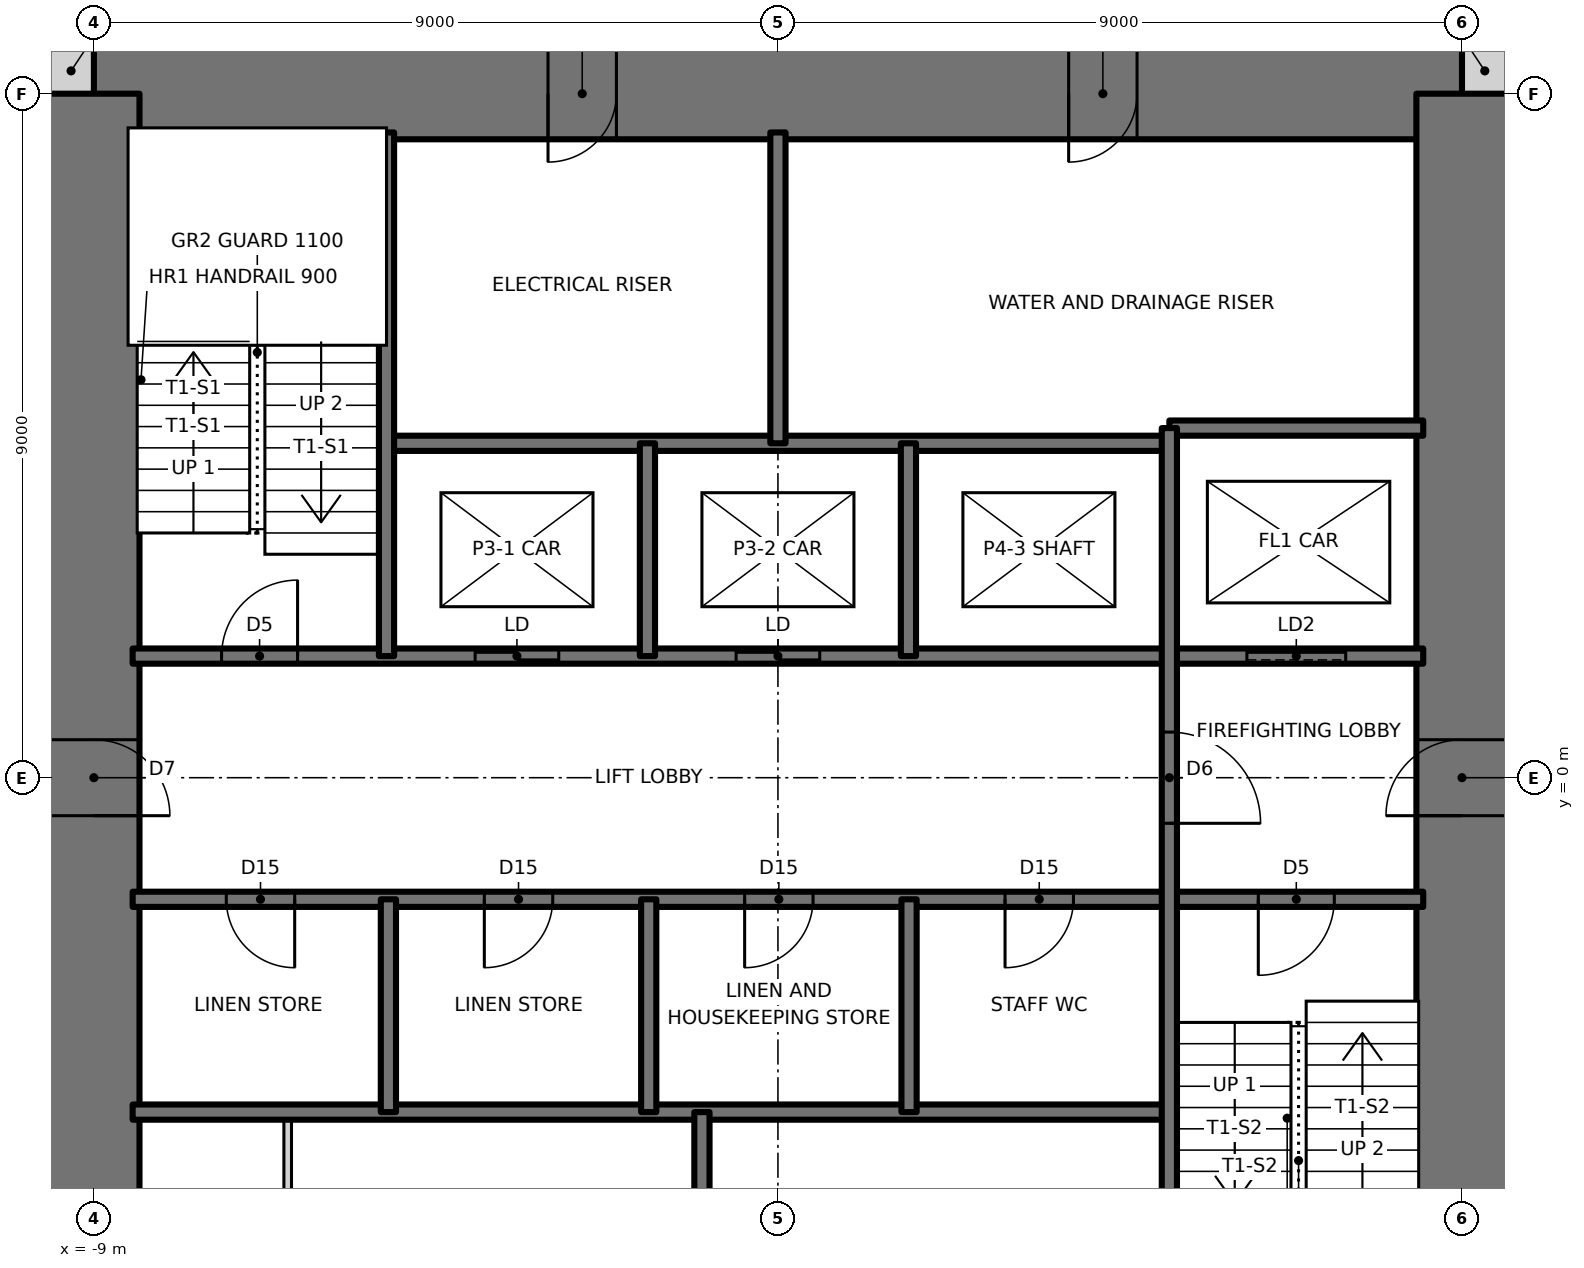
"""IFC4 building model, lengths in metres.
Left out: names, types, materials, properties, quantities, classifications, styles, units other than length and angle.
Written with IfcOpenShell. Run it as: python <this file> out.ifc"""

import sys

from ifc_helpers import new_model, si_unit, direction, frame, frame_2d, origin, place, context, subcontext, project, spatial, rectangle, extrude, element, fill, save


model = new_model("IFC4")
c1 = context("Model", 3, precision=1e-05, world=origin(), true_north=direction((0.0, 1.0)))
c2 = subcontext(c1, "Body", "Model", "MODEL_VIEW")
j1 = project(units=[si_unit("LENGTHUNIT", "METRE"), si_unit("PLANEANGLEUNIT", "RADIAN")], contexts=[c1])
p1 = place(None, origin())
s1 = spatial("IfcSite", under=j1, at=p1, CompositionType="ELEMENT")
p2 = place(p1, origin())
s2 = spatial("IfcBuilding", under=s1, at=p2, CompositionType="ELEMENT")
p3 = place(p2, frame((0.0, 0.0, 202.0)))
s3 = spatial("IfcBuildingStorey", under=s2, at=p3, CompositionType="ELEMENT", Elevation=202.0)
for number, where, z_axis, x_axis in (
    (1, (9.0, 9.3, 0.0), (0.0, 0.0, 1.0), (1.0, 0.0, 0.0)),
    (2, (-9.6, 9.3, 0.0), (0.0, 0.0, 1.0), (1.0, 0.0, 0.0)),
):
    element("IfcWall", number, at=place(p3, frame(where, z_axis=z_axis, x_axis=x_axis)), inside=s3, PredefinedType="SOLIDWALL", context=c2, shape_type="SweptSolid", body=[
        extrude(rectangle(XDim=0.6, YDim=0.6, at=frame_2d((0.3, 0.0))), origin(), (0.0, 0.0, 1.0), 3.5),
    ])
p4 = place(p3, frame((9.0, 9.0, 0.0), z_axis=(0.0, 0.0, 1.0), x_axis=(-1.0, 0.0, 0.0)))
e3 = element("IfcWall", 3, at=p4, inside=s3, PredefinedType="SHEAR", context=c2, shape_type="SweptSolid", body=[
    extrude(rectangle(XDim=18.0, YDim=1.2, at=frame_2d((9.0, 0.0))), origin(), (0.0, 0.0, 1.0), 3.5),
])
p5 = place(p4, frame((11.125, 0.0, 0.0)))
e4 = element("IfcOpeningElement", 4, at=p5, cuts=e3, PredefinedType="OPENING", context=c2, shape_type="SweptSolid", body=[
    extrude(rectangle(XDim=0.9, YDim=2.1, at=frame_2d((0.45, 1.05))), frame((0.0, 0.61, 0.0), z_axis=(0.0, -1.0, 0.0), x_axis=(1.0, 0.0, 0.0)), (0.0, 0.0, 1.0), 1.22),
])
p6 = place(p4, frame((4.275, 0.0, 0.0)))
e5 = element("IfcOpeningElement", 5, at=p6, cuts=e3, PredefinedType="OPENING", context=c2, shape_type="SweptSolid", body=[
    extrude(rectangle(XDim=0.9, YDim=2.1, at=frame_2d((0.45, 1.05))), frame((0.0, 0.61, 0.0), z_axis=(0.0, -1.0, 0.0), x_axis=(1.0, 0.0, 0.0)), (0.0, 0.0, 1.0), 1.22),
])
p7 = place(p3, frame((9.0, -9.0, 0.0), z_axis=(0.0, 0.0, 1.0), x_axis=(0.0, 1.0, 0.0)))
e6 = element("IfcWall", 6, at=p7, inside=s3, PredefinedType="SHEAR", context=c2, shape_type="SweptSolid", body=[
    extrude(rectangle(XDim=18.0, YDim=1.2, at=frame_2d((9.0, 0.0))), origin(), (0.0, 0.0, 1.0), 3.5),
])
p8 = place(p7, frame((8.5, 0.0, 0.0)))
e7 = element("IfcOpeningElement", 7, at=p8, cuts=e6, PredefinedType="OPENING", context=c2, shape_type="SweptSolid", body=[
    extrude(rectangle(XDim=1.0, YDim=2.1, at=frame_2d((0.5, 1.05))), frame((0.0, 0.61, 0.0), z_axis=(0.0, -1.0, 0.0), x_axis=(1.0, 0.0, 0.0)), (0.0, 0.0, 1.0), 1.22),
])
p9 = place(p3, frame((-9.0, 9.0, 0.0), z_axis=(0.0, 0.0, 1.0), x_axis=(0.0, -1.0, 0.0)))
e8 = element("IfcWall", 8, at=p9, inside=s3, PredefinedType="SHEAR", context=c2, shape_type="SweptSolid", body=[
    extrude(rectangle(XDim=18.0, YDim=1.2, at=frame_2d((9.0, 0.0))), origin(), (0.0, 0.0, 1.0), 3.5),
])
p10 = place(p9, frame((8.5, 0.0, 0.0)))
e9 = element("IfcOpeningElement", 9, at=p10, cuts=e8, PredefinedType="OPENING", context=c2, shape_type="SweptSolid", body=[
    extrude(rectangle(XDim=1.0, YDim=2.1, at=frame_2d((0.5, 1.05))), frame((0.0, 0.61, 0.0), z_axis=(0.0, -1.0, 0.0), x_axis=(1.0, 0.0, 0.0)), (0.0, 0.0, 1.0), 1.22),
])
p11 = place(p3, frame((-8.49, -4.4, 0.0), z_axis=(0.0, 0.0, 1.0), x_axis=(1.0, 0.0, 0.0)))
e10 = element("IfcWall", 10, at=p11, inside=s3, PredefinedType="SOLIDWALL", context=c2, shape_type="SweptSolid", body=[
    extrude(rectangle(XDim=13.64, YDim=0.2, at=frame_2d((6.82, 0.0))), origin(), (0.0, 0.0, 1.0), 3.5),
])
p12 = place(p3, frame((-8.49, -1.6, 0.0), z_axis=(0.0, 0.0, 1.0), x_axis=(1.0, 0.0, 0.0)))
e11 = element("IfcWall", 11, at=p12, inside=s3, PredefinedType="SOLIDWALL", context=c2, shape_type="SweptSolid", body=[
    extrude(rectangle(XDim=16.98, YDim=0.2, at=frame_2d((8.49, 0.0))), origin(), (0.0, 0.0, 1.0), 3.5),
])
p13 = place(p12, frame((14.81, 0.0, 0.0)))
e12 = element("IfcOpeningElement", 12, at=p13, cuts=e11, PredefinedType="OPENING", context=c2, shape_type="SweptSolid", body=[
    extrude(rectangle(XDim=1.0, YDim=2.1, at=frame_2d((0.5, 1.05))), frame((0.0, 0.11, 0.0), z_axis=(0.0, -1.0, 0.0), x_axis=(1.0, 0.0, 0.0)), (0.0, 0.0, 1.0), 0.22),
])
p14 = place(p12, frame((1.232, 0.0, 0.0)))
e13 = element("IfcOpeningElement", 13, at=p14, cuts=e11, PredefinedType="OPENING", context=c2, shape_type="SweptSolid", body=[
    extrude(rectangle(XDim=0.9, YDim=2.1, at=frame_2d((0.45, 1.05))), frame((0.0, 0.11, 0.0), z_axis=(0.0, -1.0, 0.0), x_axis=(1.0, 0.0, 0.0)), (0.0, 0.0, 1.0), 0.22),
])
p15 = place(p12, frame((4.627, 0.0, 0.0)))
e14 = element("IfcOpeningElement", 14, at=p15, cuts=e11, PredefinedType="OPENING", context=c2, shape_type="SweptSolid", body=[
    extrude(rectangle(XDim=0.9, YDim=2.1, at=frame_2d((0.45, 1.05))), frame((0.0, 0.11, 0.0), z_axis=(0.0, -1.0, 0.0), x_axis=(1.0, 0.0, 0.0)), (0.0, 0.0, 1.0), 0.22),
])
p16 = place(p12, frame((8.052, 0.0, 0.0)))
e15 = element("IfcOpeningElement", 15, at=p16, cuts=e11, PredefinedType="OPENING", context=c2, shape_type="SweptSolid", body=[
    extrude(rectangle(XDim=0.9, YDim=2.1, at=frame_2d((0.45, 1.05))), frame((0.0, 0.11, 0.0), z_axis=(0.0, -1.0, 0.0), x_axis=(1.0, 0.0, 0.0)), (0.0, 0.0, 1.0), 0.22),
])
p17 = place(p12, frame((11.478, 0.0, 0.0)))
e16 = element("IfcOpeningElement", 16, at=p17, cuts=e11, PredefinedType="OPENING", context=c2, shape_type="SweptSolid", body=[
    extrude(rectangle(XDim=0.9, YDim=2.1, at=frame_2d((0.45, 1.05))), frame((0.0, 0.11, 0.0), z_axis=(0.0, -1.0, 0.0), x_axis=(1.0, 0.0, 0.0)), (0.0, 0.0, 1.0), 0.22),
])
p18 = place(p3, frame((-8.49, 1.6, 0.0), z_axis=(0.0, 0.0, 1.0), x_axis=(1.0, 0.0, 0.0)))
e17 = element("IfcWall", 17, at=p18, inside=s3, PredefinedType="SOLIDWALL", context=c2, shape_type="SweptSolid", body=[
    extrude(rectangle(XDim=16.98, YDim=0.2, at=frame_2d((8.49, 0.0))), origin(), (0.0, 0.0, 1.0), 3.5),
])
p19 = place(p18, frame((1.17, 0.0, 0.0)))
e18 = element("IfcOpeningElement", 18, at=p19, cuts=e17, PredefinedType="OPENING", context=c2, shape_type="SweptSolid", body=[
    extrude(rectangle(XDim=1.0, YDim=2.1, at=frame_2d((0.5, 1.05))), frame((0.0, 0.11, 0.0), z_axis=(0.0, -1.0, 0.0), x_axis=(1.0, 0.0, 0.0)), (0.0, 0.0, 1.0), 0.22),
])
p20 = place(p18, frame((4.506, 0.0, 0.0)))
e19 = element("IfcOpeningElement", 19, at=p20, cuts=e17, PredefinedType="OPENING", context=c2, shape_type="SweptSolid", body=[
    extrude(rectangle(XDim=1.1, YDim=2.1, at=frame_2d((0.55, 1.05))), frame((0.0, 0.11, 0.0), z_axis=(0.0, -1.0, 0.0), x_axis=(1.0, 0.0, 0.0)), (0.0, 0.0, 1.0), 0.22),
])
p21 = place(p18, frame((7.94, 0.0, 0.0)))
e20 = element("IfcOpeningElement", 20, at=p21, cuts=e17, PredefinedType="OPENING", context=c2, shape_type="SweptSolid", body=[
    extrude(rectangle(XDim=1.1, YDim=2.1, at=frame_2d((0.55, 1.05))), frame((0.0, 0.11, 0.0), z_axis=(0.0, -1.0, 0.0), x_axis=(1.0, 0.0, 0.0)), (0.0, 0.0, 1.0), 0.22),
])
p22 = place(p18, frame((14.66, 0.0, 0.0)))
e21 = element("IfcOpeningElement", 21, at=p22, cuts=e17, PredefinedType="OPENING", context=c2, shape_type="SweptSolid", body=[
    extrude(rectangle(XDim=1.3, YDim=2.1, at=frame_2d((0.65, 1.05))), frame((0.0, 0.11, 0.0), z_axis=(0.0, -1.0, 0.0), x_axis=(1.0, 0.0, 0.0)), (0.0, 0.0, 1.0), 0.22),
])
p23 = place(p3, frame((-5.15, 4.4, 0.0), z_axis=(0.0, 0.0, 1.0), x_axis=(1.0, 0.0, 0.0)))
e22 = element("IfcWall", 22, at=p23, inside=s3, PredefinedType="SOLIDWALL", context=c2, shape_type="SweptSolid", body=[
    extrude(rectangle(XDim=10.3, YDim=0.2, at=frame_2d((5.15, 0.0))), origin(), (0.0, 0.0, 1.0), 3.5),
])
p24 = place(p3, frame((5.15, 4.6, 0.0), z_axis=(0.0, 0.0, 1.0), x_axis=(1.0, 0.0, 0.0)))
e23 = element("IfcWall", 23, at=p24, inside=s3, PredefinedType="SOLIDWALL", context=c2, shape_type="SweptSolid", body=[
    extrude(rectangle(XDim=3.34, YDim=0.2, at=frame_2d((1.67, 0.0))), origin(), (0.0, 0.0, 1.0), 3.5),
])
p25 = place(p3, frame((5.15, -8.49, 0.0), z_axis=(0.0, 0.0, 1.0), x_axis=(0.0, 1.0, 0.0)))
e24 = element("IfcWall", 24, at=p25, inside=s3, PredefinedType="SOLIDWALL", context=c2, shape_type="SweptSolid", body=[
    extrude(rectangle(XDim=13.09, YDim=0.2, at=frame_2d((6.545, 0.0))), origin(), (0.0, 0.0, 1.0), 3.5),
])
p26 = place(p25, frame((7.89, 0.0, 0.0)))
e25 = element("IfcOpeningElement", 25, at=p26, cuts=e24, PredefinedType="OPENING", context=c2, shape_type="SweptSolid", body=[
    extrude(rectangle(XDim=1.2, YDim=2.1, at=frame_2d((0.6, 1.05))), frame((0.0, 0.11, 0.0), z_axis=(0.0, -1.0, 0.0), x_axis=(1.0, 0.0, 0.0)), (0.0, 0.0, 1.0), 0.22),
])
for number, where, z_axis, x_axis in (
    (26, (1.725, -4.4, 0.0), (0.0, 0.0, 1.0), (0.0, 1.0, 0.0)),
    (27, (1.717, 1.6, 0.0), (0.0, 0.0, 1.0), (0.0, 1.0, 0.0)),
):
    element("IfcWall", number, at=place(p3, frame(where, z_axis=z_axis, x_axis=x_axis)), inside=s3, PredefinedType="SOLIDWALL", context=c2, shape_type="SweptSolid", body=[
        extrude(rectangle(XDim=2.8, YDim=0.2, at=frame_2d((1.4, 0.0))), origin(), (0.0, 0.0, 1.0), 3.5),
    ])
for number, where, z_axis, x_axis in (
    (28, (0.0, 4.4, 0.0), (0.0, 0.0, 1.0), (0.0, 1.0, 0.0)),
    (29, (-1.0, -8.49, 0.0), (0.0, 0.0, 1.0), (0.0, 1.0, 0.0)),
):
    element("IfcWall", number, at=place(p3, frame(where, z_axis=z_axis, x_axis=x_axis)), inside=s3, PredefinedType="SOLIDWALL", context=c2, shape_type="SweptSolid", body=[
        extrude(rectangle(XDim=4.09, YDim=0.2, at=frame_2d((2.045, 0.0))), origin(), (0.0, 0.0, 1.0), 3.5),
    ])
for number, where, z_axis, x_axis in (
    (30, (-1.7, -4.4, 0.0), (0.0, 0.0, 1.0), (0.0, 1.0, 0.0)),
    (31, (-1.717, 1.6, 0.0), (0.0, 0.0, 1.0), (0.0, 1.0, 0.0)),
    (32, (-5.125, -4.4, 0.0), (0.0, 0.0, 1.0), (0.0, 1.0, 0.0)),
):
    element("IfcWall", number, at=place(p3, frame(where, z_axis=z_axis, x_axis=x_axis)), inside=s3, PredefinedType="SOLIDWALL", context=c2, shape_type="SweptSolid", body=[
        extrude(rectangle(XDim=2.8, YDim=0.2, at=frame_2d((1.4, 0.0))), origin(), (0.0, 0.0, 1.0), 3.5),
    ])
p27 = place(p3, frame((-5.15, 1.6, 0.0), z_axis=(0.0, 0.0, 1.0), x_axis=(0.0, 1.0, 0.0)))
e33 = element("IfcWall", 33, at=p27, inside=s3, PredefinedType="SOLIDWALL", context=c2, shape_type="SweptSolid", body=[
    extrude(rectangle(XDim=6.89, YDim=0.2, at=frame_2d((3.445, 0.0))), origin(), (0.0, 0.0, 1.0), 3.5),
])
p28 = place(p3, frame((-6.45, -8.49, 0.0), z_axis=(0.0, 0.0, 1.0), x_axis=(0.0, 1.0, 0.0)))
e34 = element("IfcWall", 34, at=p28, inside=s3, PredefinedType="PARTITIONING", context=c2, shape_type="SweptSolid", body=[
    extrude(rectangle(XDim=4.09, YDim=0.1, at=frame_2d((2.045, 0.0))), origin(), (0.0, 0.0, 1.0), 3.3),
])
p29 = place(p28, frame((1.595, 0.0, 0.0)))
e35 = element("IfcOpeningElement", 35, at=p29, cuts=e34, PredefinedType="OPENING", context=c2, shape_type="SweptSolid", body=[
    extrude(rectangle(XDim=0.9, YDim=2.1, at=frame_2d((0.45, 1.05))), frame((0.0, 0.06, 0.0), z_axis=(0.0, -1.0, 0.0), x_axis=(1.0, 0.0, 0.0)), (0.0, 0.0, 1.0), 0.12),
])
p30 = place(p19, origin())
e36 = element("IfcDoor", 36, at=p30, inside=s3, OperationType="SINGLE_SWING_RIGHT", PredefinedType="DOOR", context=c2, shape_type="SweptSolid", body=[
    extrude(rectangle(XDim=1.0, YDim=2.1, at=frame_2d((0.5, 1.05))), frame((0.0, 0.025, 0.0), z_axis=(0.0, -1.0, 0.0), x_axis=(1.0, 0.0, 0.0)), (0.0, 0.0, 1.0), 0.05),
])
fill(e18, e36)
p31 = place(p13, frame((1.0, 0.0, 0.0), z_axis=(0.0, 0.0, 1.0), x_axis=(-1.0, 0.0, 0.0)))
e37 = element("IfcDoor", 37, at=p31, inside=s3, OperationType="SINGLE_SWING_RIGHT", PredefinedType="DOOR", context=c2, shape_type="SweptSolid", body=[
    extrude(rectangle(XDim=1.0, YDim=2.1, at=frame_2d((0.5, 1.05))), frame((0.0, 0.025, 0.0), z_axis=(0.0, -1.0, 0.0), x_axis=(1.0, 0.0, 0.0)), (0.0, 0.0, 1.0), 0.05),
])
fill(e12, e37)
p32 = place(p26, frame((1.2, 0.0, 0.0), z_axis=(0.0, 0.0, 1.0), x_axis=(-1.0, 0.0, 0.0)))
e38 = element("IfcDoor", 38, at=p32, inside=s3, OperationType="SINGLE_SWING_RIGHT", PredefinedType="DOOR", context=c2, shape_type="SweptSolid", body=[
    extrude(rectangle(XDim=1.2, YDim=2.1, at=frame_2d((0.6, 1.05))), frame((0.0, 0.025, 0.0), z_axis=(0.0, -1.0, 0.0), x_axis=(1.0, 0.0, 0.0)), (0.0, 0.0, 1.0), 0.05),
])
fill(e25, e38)
p33 = place(p14, frame((0.9, 0.0, 0.0), z_axis=(0.0, 0.0, 1.0), x_axis=(-1.0, 0.0, 0.0)))
e39 = element("IfcDoor", 39, at=p33, inside=s3, OperationType="SINGLE_SWING_LEFT", PredefinedType="DOOR", context=c2, shape_type="SweptSolid", body=[
    extrude(rectangle(XDim=0.9, YDim=2.1, at=frame_2d((0.45, 1.05))), frame((0.0, 0.025, 0.0), z_axis=(0.0, -1.0, 0.0), x_axis=(1.0, 0.0, 0.0)), (0.0, 0.0, 1.0), 0.05),
])
fill(e13, e39)
p34 = place(p15, frame((0.9, 0.0, 0.0), z_axis=(0.0, 0.0, 1.0), x_axis=(-1.0, 0.0, 0.0)))
e40 = element("IfcDoor", 40, at=p34, inside=s3, OperationType="SINGLE_SWING_RIGHT", PredefinedType="DOOR", context=c2, shape_type="SweptSolid", body=[
    extrude(rectangle(XDim=0.9, YDim=2.1, at=frame_2d((0.45, 1.05))), frame((0.0, 0.025, 0.0), z_axis=(0.0, -1.0, 0.0), x_axis=(1.0, 0.0, 0.0)), (0.0, 0.0, 1.0), 0.05),
])
fill(e14, e40)
p35 = place(p16, frame((0.9, 0.0, 0.0), z_axis=(0.0, 0.0, 1.0), x_axis=(-1.0, 0.0, 0.0)))
e41 = element("IfcDoor", 41, at=p35, inside=s3, OperationType="SINGLE_SWING_RIGHT", PredefinedType="DOOR", context=c2, shape_type="SweptSolid", body=[
    extrude(rectangle(XDim=0.9, YDim=2.1, at=frame_2d((0.45, 1.05))), frame((0.0, 0.025, 0.0), z_axis=(0.0, -1.0, 0.0), x_axis=(1.0, 0.0, 0.0)), (0.0, 0.0, 1.0), 0.05),
])
fill(e15, e41)
p36 = place(p17, frame((0.9, 0.0, 0.0), z_axis=(0.0, 0.0, 1.0), x_axis=(-1.0, 0.0, 0.0)))
e42 = element("IfcDoor", 42, at=p36, inside=s3, OperationType="SINGLE_SWING_RIGHT", PredefinedType="DOOR", context=c2, shape_type="SweptSolid", body=[
    extrude(rectangle(XDim=0.9, YDim=2.1, at=frame_2d((0.45, 1.05))), frame((0.0, 0.025, 0.0), z_axis=(0.0, -1.0, 0.0), x_axis=(1.0, 0.0, 0.0)), (0.0, 0.0, 1.0), 0.05),
])
fill(e16, e42)
p37 = place(p10, origin())
e43 = element("IfcDoor", 43, at=p37, inside=s3, OperationType="SINGLE_SWING_RIGHT", PredefinedType="DOOR", context=c2, shape_type="SweptSolid", body=[
    extrude(rectangle(XDim=1.0, YDim=2.1, at=frame_2d((0.5, 1.05))), frame((0.0, 0.025, 0.0), z_axis=(0.0, -1.0, 0.0), x_axis=(1.0, 0.0, 0.0)), (0.0, 0.0, 1.0), 0.05),
])
fill(e9, e43)
p38 = place(p8, origin())
e44 = element("IfcDoor", 44, at=p38, inside=s3, OperationType="SINGLE_SWING_LEFT", PredefinedType="DOOR", context=c2, shape_type="SweptSolid", body=[
    extrude(rectangle(XDim=1.0, YDim=2.1, at=frame_2d((0.5, 1.05))), frame((0.0, 0.025, 0.0), z_axis=(0.0, -1.0, 0.0), x_axis=(1.0, 0.0, 0.0)), (0.0, 0.0, 1.0), 0.05),
])
fill(e7, e44)
p39 = place(p5, origin())
e45 = element("IfcDoor", 45, at=p39, inside=s3, OperationType="SINGLE_SWING_RIGHT", PredefinedType="DOOR", context=c2, shape_type="SweptSolid", body=[
    extrude(rectangle(XDim=0.9, YDim=2.1, at=frame_2d((0.45, 1.05))), frame((0.0, 0.025, 0.0), z_axis=(0.0, -1.0, 0.0), x_axis=(1.0, 0.0, 0.0)), (0.0, 0.0, 1.0), 0.05),
])
fill(e4, e45)
p40 = place(p6, origin())
e46 = element("IfcDoor", 46, at=p40, inside=s3, OperationType="SINGLE_SWING_RIGHT", PredefinedType="DOOR", context=c2, shape_type="SweptSolid", body=[
    extrude(rectangle(XDim=0.9, YDim=2.1, at=frame_2d((0.45, 1.05))), frame((0.0, 0.025, 0.0), z_axis=(0.0, -1.0, 0.0), x_axis=(1.0, 0.0, 0.0)), (0.0, 0.0, 1.0), 0.05),
])
fill(e5, e46)
p41 = place(p20, origin())
e47 = element("IfcDoor", 47, at=p41, inside=s3, OperationType="DOUBLE_DOOR_SLIDING", PredefinedType="DOOR", context=c2, shape_type="SweptSolid", body=[
    extrude(rectangle(XDim=1.1, YDim=2.1, at=frame_2d((0.55, 1.05))), frame((0.0, 0.025, 0.0), z_axis=(0.0, -1.0, 0.0), x_axis=(1.0, 0.0, 0.0)), (0.0, 0.0, 1.0), 0.05),
])
fill(e19, e47)
p42 = place(p21, origin())
e48 = element("IfcDoor", 48, at=p42, inside=s3, OperationType="DOUBLE_DOOR_SLIDING", PredefinedType="DOOR", context=c2, shape_type="SweptSolid", body=[
    extrude(rectangle(XDim=1.1, YDim=2.1, at=frame_2d((0.55, 1.05))), frame((0.0, 0.025, 0.0), z_axis=(0.0, -1.0, 0.0), x_axis=(1.0, 0.0, 0.0)), (0.0, 0.0, 1.0), 0.05),
])
fill(e20, e48)
p43 = place(p22, origin())
e49 = element("IfcDoor", 49, at=p43, inside=s3, OperationType="SLIDING_TO_LEFT", PredefinedType="DOOR", context=c2, shape_type="SweptSolid", body=[
    extrude(rectangle(XDim=1.3, YDim=2.1, at=frame_2d((0.65, 1.05))), frame((0.0, 0.025, 0.0), z_axis=(0.0, -1.0, 0.0), x_axis=(1.0, 0.0, 0.0)), (0.0, 0.0, 1.0), 0.05),
])
fill(e21, e49)
save(model, sys.argv[1])
